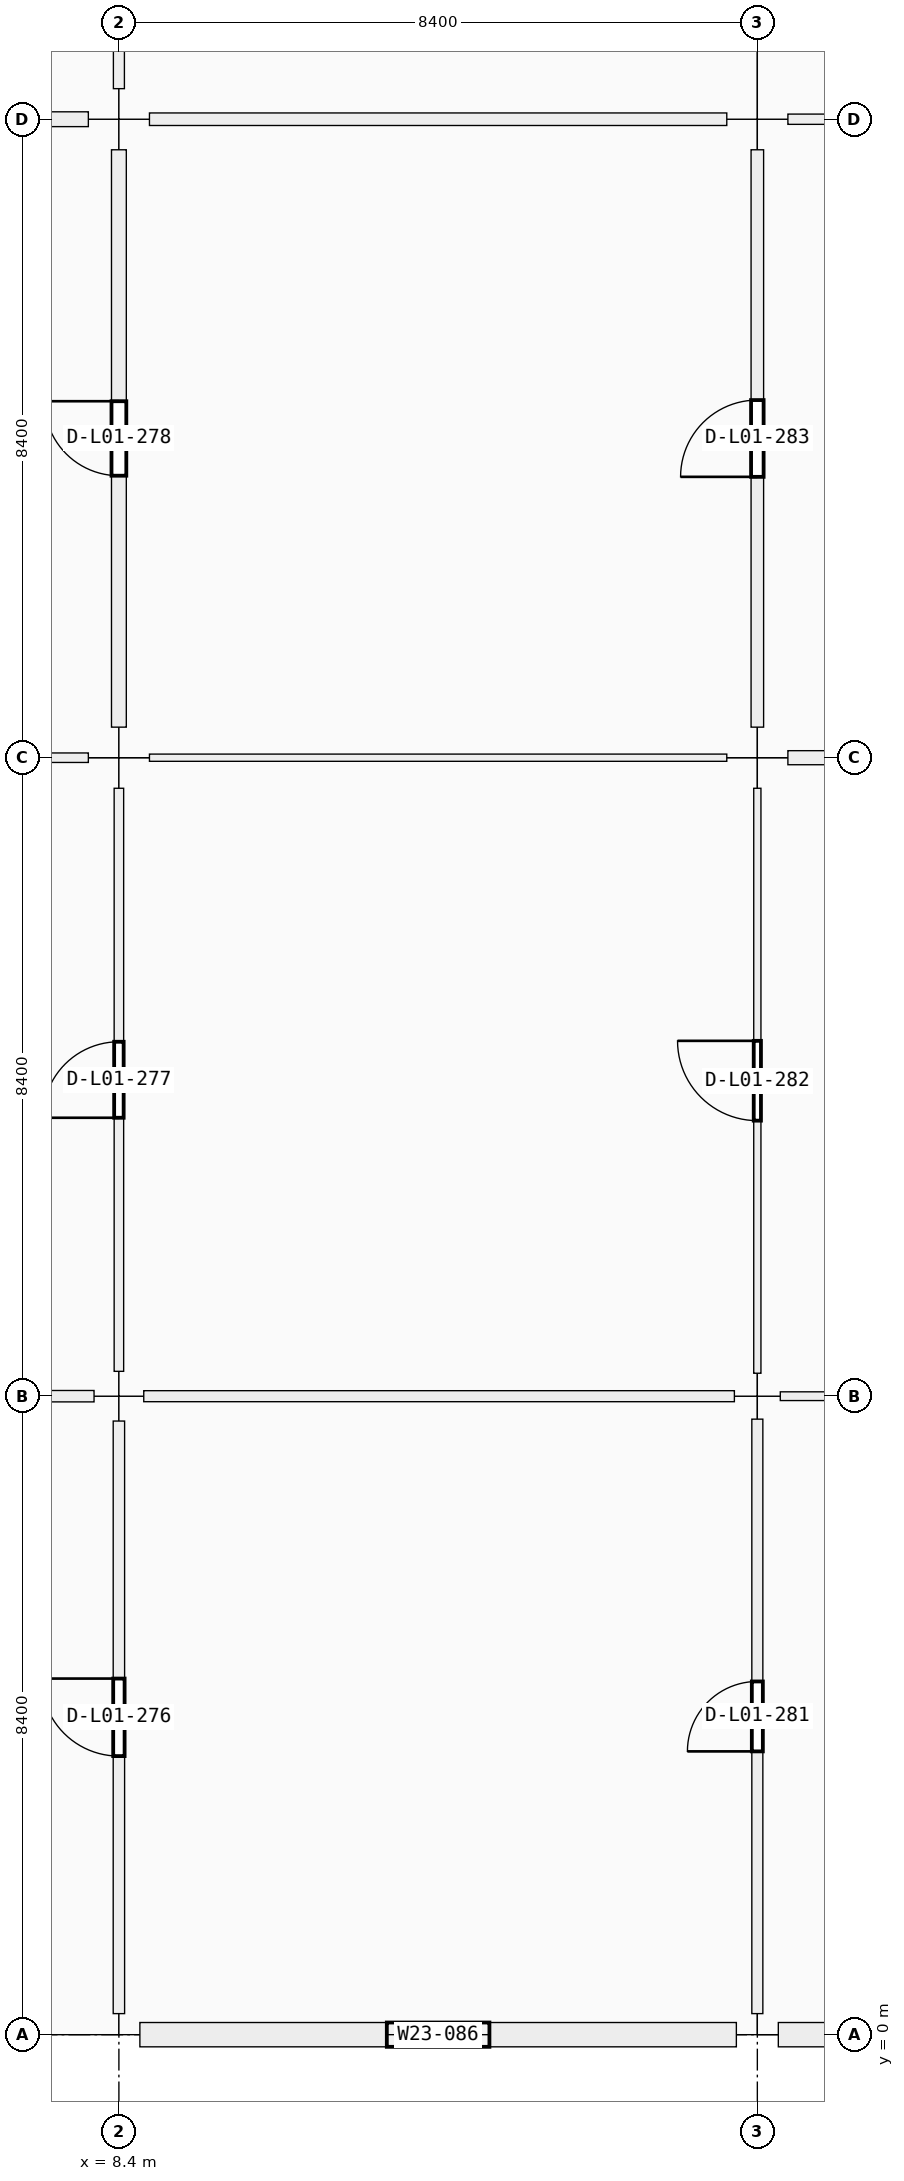
"""IFC4 building model, lengths in metres.
Left out: names, types, materials, properties, quantities, classifications, styles, units other than length and angle.
Written with IfcOpenShell. Run it as: python <this file> out.ifc"""

import sys

from ifc_helpers import new_model, si_unit, direction, frame, frame_2d, origin, origin_2d, place, context, subcontext, project, spatial, rectangle, extrude, element, fill, save


model = new_model("IFC4")
c1 = context("Model", 3, precision=1e-05, world=origin(), true_north=direction((0.0, 1.0)))
c2 = subcontext(c1, "Body", "Model", "MODEL_VIEW")
j1 = project(units=[si_unit("LENGTHUNIT", "METRE"), si_unit("PLANEANGLEUNIT", "RADIAN")], contexts=[c1])
p1 = place(None, origin())
s1 = spatial("IfcSite", under=j1, at=p1, CompositionType="ELEMENT")
p2 = place(p1, origin())
s2 = spatial("IfcBuilding", under=s1, at=p2, CompositionType="ELEMENT")
p3 = place(p2, frame((0.0, 0.0, 5.76)))
s3 = spatial("IfcBuildingStorey", under=s2, at=p3, CompositionType="ELEMENT", Elevation=5.76)
p4 = place(p3, frame((8.4, 0.0, 0.0), z_axis=(0.0, 0.0, 1.0), x_axis=(1.0, 0.0, 0.0)))
e1 = element("IfcColumn", 1, at=p4, inside=s3, PredefinedType="COLUMN", context=c2, shape_type="SweptSolid", body=[
    extrude(rectangle(XDim=0.55, YDim=0.55, at=origin_2d()), origin(), (0.0, 0.0, 1.0), 4.2),
])
p5 = place(p3, frame((8.4, 8.4, 0.0), z_axis=(0.0, 0.0, 1.0), x_axis=(1.0, 0.0, 0.0)))
e2 = element("IfcColumn", 2, at=p5, inside=s3, PredefinedType="COLUMN", context=c2, shape_type="SweptSolid", body=[
    extrude(rectangle(XDim=0.65, YDim=0.65, at=origin_2d()), origin(), (0.0, 0.0, 1.0), 4.5),
])
for number, where, z_axis, x_axis in (
    (3, (8.4, 16.8, 0.0), (0.0, 0.0, 1.0), (1.0, 0.0, 0.0)),
    (4, (8.4, 25.2, 0.0), (0.0, 0.0, 1.0), (1.0, 0.0, 0.0)),
):
    element("IfcColumn", number, at=place(p3, frame(where, z_axis=z_axis, x_axis=x_axis)), inside=s3, PredefinedType="COLUMN", context=c2, shape_type="SweptSolid", body=[
        extrude(rectangle(XDim=0.8, YDim=0.8, at=origin_2d()), origin(), (0.0, 0.0, 1.0), 4.5),
    ])
p6 = place(p3, frame((16.8, 0.0, 0.0), z_axis=(0.0, 0.0, 1.0), x_axis=(1.0, 0.0, 0.0)))
e5 = element("IfcColumn", 5, at=p6, inside=s3, PredefinedType="COLUMN", context=c2, shape_type="SweptSolid", body=[
    extrude(rectangle(XDim=0.55, YDim=0.55, at=origin_2d()), origin(), (0.0, 0.0, 1.0), 4.2),
])
p7 = place(p3, frame((16.8, 8.4, 0.0), z_axis=(0.0, 0.0, 1.0), x_axis=(1.0, 0.0, 0.0)))
e6 = element("IfcColumn", 6, at=p7, inside=s3, PredefinedType="COLUMN", context=c2, shape_type="SweptSolid", body=[
    extrude(rectangle(XDim=0.6, YDim=0.6, at=origin_2d()), origin(), (0.0, 0.0, 1.0), 4.5),
])
for number, where, z_axis, x_axis in (
    (7, (16.8, 16.8, 0.0), (0.0, 0.0, 1.0), (1.0, 0.0, 0.0)),
    (8, (16.8, 25.2, 0.0), (0.0, 0.0, 1.0), (1.0, 0.0, 0.0)),
):
    element("IfcColumn", number, at=place(p3, frame(where, z_axis=z_axis, x_axis=x_axis)), inside=s3, PredefinedType="COLUMN", context=c2, shape_type="SweptSolid", body=[
        extrude(rectangle(XDim=0.8, YDim=0.8, at=origin_2d()), origin(), (0.0, 0.0, 1.0), 4.5),
    ])
p8 = place(p3, frame((16.524, 0.0, 0.0), z_axis=(0.0, 0.0, 1.0), x_axis=(-1.0, 0.0, 0.0)))
e9 = element("IfcWall", 9, at=p8, inside=s3, PredefinedType="SOLIDWALL", context=c2, shape_type="SweptSolid", body=[
    extrude(rectangle(XDim=7.848, YDim=0.32, at=frame_2d((3.924, 0.0))), origin(), (0.0, 0.0, 1.0), 3.4),
])
p9 = place(p8, frame((3.249, 0.0, 0.9)))
e10 = element("IfcOpeningElement", 10, at=p9, cuts=e9, PredefinedType="OPENING", context=c2, shape_type="SweptSolid", body=[
    extrude(rectangle(XDim=1.35, YDim=1.5, at=frame_2d((0.675, 0.75))), frame((0.0, 0.16, 0.0), z_axis=(0.0, -1.0, 0.0), x_axis=(1.0, 0.0, 0.0)), (0.0, 0.0, 1.0), 0.32),
])
p10 = place(p3, frame((24.924, 0.0, 0.0), z_axis=(0.0, 0.0, 1.0), x_axis=(-1.0, 0.0, 0.0)))
e11 = element("IfcWall", 11, at=p10, inside=s3, PredefinedType="SOLIDWALL", context=c2, shape_type="SweptSolid", body=[
    extrude(rectangle(XDim=7.848, YDim=0.32, at=frame_2d((3.924, 0.0))), origin(), (0.0, 0.0, 1.0), 3.4),
])
p11 = place(p10, frame((3.374, 0.0, 0.9)))
e12 = element("IfcOpeningElement", 12, at=p11, cuts=e11, PredefinedType="OPENING", context=c2, shape_type="SweptSolid", body=[
    extrude(rectangle(XDim=1.1, YDim=1.5, at=frame_2d((0.55, 0.75))), frame((0.0, 0.16, 0.0), z_axis=(0.0, -1.0, 0.0), x_axis=(1.0, 0.0, 0.0)), (0.0, 0.0, 1.0), 0.32),
])
p12 = place(p3, frame((0.277, 8.4, 0.0), z_axis=(0.0, 0.0, 1.0), x_axis=(1.0, 0.0, 0.0)))
e13 = element("IfcWall", 13, at=p12, inside=s3, PredefinedType="MOVABLE", context=c2, shape_type="SweptSolid", body=[
    extrude(rectangle(XDim=7.796, YDim=0.15, at=frame_2d((3.898, 0.0))), origin(), (0.0, 0.0, 1.0), 2.4),
])
p13 = place(p12, frame((3.358, 0.0, 0.0)))
e14 = element("IfcOpeningElement", 14, at=p13, cuts=e13, PredefinedType="OPENING", context=c2, shape_type="SweptSolid", body=[
    extrude(rectangle(XDim=1.08, YDim=2.22, at=frame_2d((0.54, 1.11))), frame((0.0, 0.075, 0.0), z_axis=(0.0, -1.0, 0.0), x_axis=(1.0, 0.0, 0.0)), (0.0, 0.0, 1.0), 0.15),
])
p14 = place(p3, frame((0.277, 16.8, 0.0), z_axis=(0.0, 0.0, 1.0), x_axis=(1.0, 0.0, 0.0)))
e15 = element("IfcWall", 15, at=p14, inside=s3, PredefinedType="PARTITIONING", context=c2, shape_type="SweptSolid", body=[
    extrude(rectangle(XDim=7.721, YDim=0.125, at=frame_2d((3.86, 0.0))), origin(), (0.0, 0.0, 1.0), 2.4),
])
p15 = place(p14, frame((3.33, 0.0, 0.0)))
e16 = element("IfcOpeningElement", 16, at=p15, cuts=e15, PredefinedType="OPENING", context=c2, shape_type="SweptSolid", body=[
    extrude(rectangle(XDim=1.06, YDim=2.22, at=frame_2d((0.53, 1.11))), frame((0.0, 0.062, 0.0), z_axis=(0.0, -1.0, 0.0), x_axis=(1.0, 0.0, 0.0)), (0.0, 0.0, 1.0), 0.125),
])
p16 = place(p3, frame((0.277, 25.2, 0.0), z_axis=(0.0, 0.0, 1.0), x_axis=(1.0, 0.0, 0.0)))
e17 = element("IfcWall", 17, at=p16, inside=s3, PredefinedType="PARTITIONING", context=c2, shape_type="SweptSolid", body=[
    extrude(rectangle(XDim=7.721, YDim=0.195, at=frame_2d((3.86, 0.0))), origin(), (0.0, 0.0, 1.0), 2.4),
])
p17 = place(p16, frame((3.396, 0.0, 0.0)))
e18 = element("IfcOpeningElement", 18, at=p17, cuts=e17, PredefinedType="OPENING", context=c2, shape_type="SweptSolid", body=[
    extrude(rectangle(XDim=0.93, YDim=2.12, at=frame_2d((0.465, 1.06))), frame((0.0, 0.098, 0.0), z_axis=(0.0, -1.0, 0.0), x_axis=(1.0, 0.0, 0.0)), (0.0, 0.0, 1.0), 0.195),
])
p18 = place(p3, frame((8.727, 8.4, 0.0), z_axis=(0.0, 0.0, 1.0), x_axis=(1.0, 0.0, 0.0)))
e19 = element("IfcWall", 19, at=p18, inside=s3, PredefinedType="PARTITIONING", context=c2, shape_type="SweptSolid", body=[
    extrude(rectangle(XDim=7.771, YDim=0.145, at=frame_2d((3.885, 0.0))), origin(), (0.0, 0.0, 1.0), 2.4),
])
p19 = place(p18, frame((3.415, 0.0, 0.0)))
e20 = element("IfcOpeningElement", 20, at=p19, cuts=e19, PredefinedType="OPENING", context=c2, shape_type="SweptSolid", body=[
    extrude(rectangle(XDim=0.94, YDim=2.15, at=frame_2d((0.47, 1.075))), frame((0.0, 0.073, 0.0), z_axis=(0.0, -1.0, 0.0), x_axis=(1.0, 0.0, 0.0)), (0.0, 0.0, 1.0), 0.145),
])
p20 = place(p3, frame((8.802, 16.8, 0.0), z_axis=(0.0, 0.0, 1.0), x_axis=(1.0, 0.0, 0.0)))
e21 = element("IfcWall", 21, at=p20, inside=s3, PredefinedType="PARTITIONING", context=c2, shape_type="SweptSolid", body=[
    extrude(rectangle(XDim=7.596, YDim=0.095, at=frame_2d((3.798, 0.0))), origin(), (0.0, 0.0, 1.0), 2.4),
])
p21 = place(p20, frame((3.258, 0.0, 0.0)))
e22 = element("IfcOpeningElement", 22, at=p21, cuts=e21, PredefinedType="OPENING", context=c2, shape_type="SweptSolid", body=[
    extrude(rectangle(XDim=1.08, YDim=2.22, at=frame_2d((0.54, 1.11))), frame((0.0, 0.047, 0.0), z_axis=(0.0, -1.0, 0.0), x_axis=(1.0, 0.0, 0.0)), (0.0, 0.0, 1.0), 0.095),
])
p22 = place(p3, frame((8.802, 25.2, 0.0), z_axis=(0.0, 0.0, 1.0), x_axis=(1.0, 0.0, 0.0)))
e23 = element("IfcWall", 23, at=p22, inside=s3, PredefinedType="PARTITIONING", context=c2, shape_type="SweptSolid", body=[
    extrude(rectangle(XDim=7.596, YDim=0.165, at=frame_2d((3.798, 0.0))), origin(), (0.0, 0.0, 1.0), 2.4),
])
p23 = place(p22, frame((3.318, 0.0, 0.0)))
e24 = element("IfcOpeningElement", 24, at=p23, cuts=e23, PredefinedType="OPENING", context=c2, shape_type="SweptSolid", body=[
    extrude(rectangle(XDim=0.96, YDim=2.18, at=frame_2d((0.48, 1.09))), frame((0.0, 0.083, 0.0), z_axis=(0.0, -1.0, 0.0), x_axis=(1.0, 0.0, 0.0)), (0.0, 0.0, 1.0), 0.165),
])
p24 = place(p3, frame((17.102, 8.4, 0.0), z_axis=(0.0, 0.0, 1.0), x_axis=(1.0, 0.0, 0.0)))
e25 = element("IfcWall", 25, at=p24, inside=s3, PredefinedType="PARTITIONING", context=c2, shape_type="SweptSolid", body=[
    extrude(rectangle(XDim=7.771, YDim=0.115, at=frame_2d((3.885, 0.0))), origin(), (0.0, 0.0, 1.0), 2.4),
])
p25 = place(p24, frame((3.361, 0.0, 0.0)))
e26 = element("IfcOpeningElement", 26, at=p25, cuts=e25, PredefinedType="OPENING", context=c2, shape_type="SweptSolid", body=[
    extrude(rectangle(XDim=1.05, YDim=2.12, at=frame_2d((0.525, 1.06))), frame((0.0, 0.058, 0.0), z_axis=(0.0, -1.0, 0.0), x_axis=(1.0, 0.0, 0.0)), (0.0, 0.0, 1.0), 0.115),
])
p26 = place(p3, frame((17.202, 16.8, 0.0), z_axis=(0.0, 0.0, 1.0), x_axis=(1.0, 0.0, 0.0)))
e27 = element("IfcWall", 27, at=p26, inside=s3, PredefinedType="PARTITIONING", context=c2, shape_type="SweptSolid", body=[
    extrude(rectangle(XDim=7.596, YDim=0.185, at=frame_2d((3.798, 0.0))), origin(), (0.0, 0.0, 1.0), 2.4),
])
p27 = place(p26, frame((3.268, 0.0, 0.0)))
e28 = element("IfcOpeningElement", 28, at=p27, cuts=e27, PredefinedType="OPENING", context=c2, shape_type="SweptSolid", body=[
    extrude(rectangle(XDim=1.06, YDim=2.22, at=frame_2d((0.53, 1.11))), frame((0.0, 0.093, 0.0), z_axis=(0.0, -1.0, 0.0), x_axis=(1.0, 0.0, 0.0)), (0.0, 0.0, 1.0), 0.185),
])
p28 = place(p3, frame((17.202, 25.2, 0.0), z_axis=(0.0, 0.0, 1.0), x_axis=(1.0, 0.0, 0.0)))
e29 = element("IfcWall", 29, at=p28, inside=s3, PredefinedType="PARTITIONING", context=c2, shape_type="SweptSolid", body=[
    extrude(rectangle(XDim=7.596, YDim=0.135, at=frame_2d((3.798, 0.0))), origin(), (0.0, 0.0, 1.0), 2.4),
])
p29 = place(p28, frame((3.338, 0.0, 0.0)))
e30 = element("IfcOpeningElement", 30, at=p29, cuts=e29, PredefinedType="OPENING", context=c2, shape_type="SweptSolid", body=[
    extrude(rectangle(XDim=0.92, YDim=2.15, at=frame_2d((0.46, 1.075))), frame((0.0, 0.067, 0.0), z_axis=(0.0, -1.0, 0.0), x_axis=(1.0, 0.0, 0.0)), (0.0, 0.0, 1.0), 0.135),
])
p30 = place(p3, frame((8.4, 0.277, 0.0), z_axis=(0.0, 0.0, 1.0), x_axis=(0.0, 1.0, 0.0)))
e31 = element("IfcWall", 31, at=p30, inside=s3, PredefinedType="MOVABLE", context=c2, shape_type="SweptSolid", body=[
    extrude(rectangle(XDim=7.796, YDim=0.15, at=frame_2d((3.898, 0.0))), origin(), (0.0, 0.0, 1.0), 2.4),
])
p31 = place(p30, frame((3.388, 0.0, 0.0)))
e32 = element("IfcOpeningElement", 32, at=p31, cuts=e31, PredefinedType="OPENING", context=c2, shape_type="SweptSolid", body=[
    extrude(rectangle(XDim=1.02, YDim=2.2, at=frame_2d((0.51, 1.1))), frame((0.0, 0.075, 0.0), z_axis=(0.0, -1.0, 0.0), x_axis=(1.0, 0.0, 0.0)), (0.0, 0.0, 1.0), 0.15),
])
p32 = place(p3, frame((8.4, 8.727, 0.0), z_axis=(0.0, 0.0, 1.0), x_axis=(0.0, 1.0, 0.0)))
e33 = element("IfcWall", 33, at=p32, inside=s3, PredefinedType="PARTITIONING", context=c2, shape_type="SweptSolid", body=[
    extrude(rectangle(XDim=7.671, YDim=0.125, at=frame_2d((3.835, 0.0))), origin(), (0.0, 0.0, 1.0), 2.4),
])
p33 = place(p32, frame((3.336, 0.0, 0.0)))
e34 = element("IfcOpeningElement", 34, at=p33, cuts=e33, PredefinedType="OPENING", context=c2, shape_type="SweptSolid", body=[
    extrude(rectangle(XDim=1.0, YDim=2.2, at=frame_2d((0.5, 1.1))), frame((0.0, 0.062, 0.0), z_axis=(0.0, -1.0, 0.0), x_axis=(1.0, 0.0, 0.0)), (0.0, 0.0, 1.0), 0.125),
])
p34 = place(p3, frame((8.4, 17.202, 0.0), z_axis=(0.0, 0.0, 1.0), x_axis=(0.0, 1.0, 0.0)))
e35 = element("IfcWall", 35, at=p34, inside=s3, PredefinedType="PARTITIONING", context=c2, shape_type="SweptSolid", body=[
    extrude(rectangle(XDim=7.596, YDim=0.195, at=frame_2d((3.798, 0.0))), origin(), (0.0, 0.0, 1.0), 2.4),
])
p35 = place(p34, frame((3.308, 0.0, 0.0)))
e36 = element("IfcOpeningElement", 36, at=p35, cuts=e35, PredefinedType="OPENING", context=c2, shape_type="SweptSolid", body=[
    extrude(rectangle(XDim=0.98, YDim=2.18, at=frame_2d((0.49, 1.09))), frame((0.0, 0.098, 0.0), z_axis=(0.0, -1.0, 0.0), x_axis=(1.0, 0.0, 0.0)), (0.0, 0.0, 1.0), 0.195),
])
p36 = place(p3, frame((8.4, 25.602, 0.0), z_axis=(0.0, 0.0, 1.0), x_axis=(0.0, 1.0, 0.0)))
e37 = element("IfcWall", 37, at=p36, inside=s3, PredefinedType="PARTITIONING", context=c2, shape_type="SweptSolid", body=[
    extrude(rectangle(XDim=7.596, YDim=0.145, at=frame_2d((3.798, 0.0))), origin(), (0.0, 0.0, 1.0), 2.4),
])
p37 = place(p36, frame((3.313, 0.0, 0.0)))
e38 = element("IfcOpeningElement", 38, at=p37, cuts=e37, PredefinedType="OPENING", context=c2, shape_type="SweptSolid", body=[
    extrude(rectangle(XDim=0.97, YDim=2.12, at=frame_2d((0.485, 1.06))), frame((0.0, 0.073, 0.0), z_axis=(0.0, -1.0, 0.0), x_axis=(1.0, 0.0, 0.0)), (0.0, 0.0, 1.0), 0.145),
])
p38 = place(p3, frame((16.8, 0.277, 0.0), z_axis=(0.0, 0.0, 1.0), x_axis=(0.0, 1.0, 0.0)))
e39 = element("IfcWall", 39, at=p38, inside=s3, PredefinedType="PARTITIONING", context=c2, shape_type="SweptSolid", body=[
    extrude(rectangle(XDim=7.821, YDim=0.145, at=frame_2d((3.91, 0.0))), origin(), (0.0, 0.0, 1.0), 2.4),
])
p39 = place(p38, frame((3.45, 0.0, 0.0)))
e40 = element("IfcOpeningElement", 40, at=p39, cuts=e39, PredefinedType="OPENING", context=c2, shape_type="SweptSolid", body=[
    extrude(rectangle(XDim=0.92, YDim=2.15, at=frame_2d((0.46, 1.075))), frame((0.0, 0.073, 0.0), z_axis=(0.0, -1.0, 0.0), x_axis=(1.0, 0.0, 0.0)), (0.0, 0.0, 1.0), 0.145),
])
p40 = place(p3, frame((16.8, 8.702, 0.0), z_axis=(0.0, 0.0, 1.0), x_axis=(0.0, 1.0, 0.0)))
e41 = element("IfcWall", 41, at=p40, inside=s3, PredefinedType="PARTITIONING", context=c2, shape_type="SweptSolid", body=[
    extrude(rectangle(XDim=7.696, YDim=0.095, at=frame_2d((3.848, 0.0))), origin(), (0.0, 0.0, 1.0), 2.4),
])
p41 = place(p40, frame((3.323, 0.0, 0.0)))
e42 = element("IfcOpeningElement", 42, at=p41, cuts=e41, PredefinedType="OPENING", context=c2, shape_type="SweptSolid", body=[
    extrude(rectangle(XDim=1.05, YDim=2.12, at=frame_2d((0.525, 1.06))), frame((0.0, 0.047, 0.0), z_axis=(0.0, -1.0, 0.0), x_axis=(1.0, 0.0, 0.0)), (0.0, 0.0, 1.0), 0.095),
])
p42 = place(p3, frame((16.8, 17.202, 0.0), z_axis=(0.0, 0.0, 1.0), x_axis=(0.0, 1.0, 0.0)))
e43 = element("IfcWall", 43, at=p42, inside=s3, PredefinedType="PARTITIONING", context=c2, shape_type="SweptSolid", body=[
    extrude(rectangle(XDim=7.596, YDim=0.165, at=frame_2d((3.798, 0.0))), origin(), (0.0, 0.0, 1.0), 2.4),
])
p43 = place(p42, frame((3.293, 0.0, 0.0)))
e44 = element("IfcOpeningElement", 44, at=p43, cuts=e43, PredefinedType="OPENING", context=c2, shape_type="SweptSolid", body=[
    extrude(rectangle(XDim=1.01, YDim=2.12, at=frame_2d((0.505, 1.06))), frame((0.0, 0.083, 0.0), z_axis=(0.0, -1.0, 0.0), x_axis=(1.0, 0.0, 0.0)), (0.0, 0.0, 1.0), 0.165),
])
p44 = place(p9, origin())
e45 = element("IfcWindow", 45, at=p44, inside=s3, PartitioningType="SINGLE_PANEL", PredefinedType="WINDOW", context=c2, shape_type="SweptSolid", body=[
    extrude(rectangle(XDim=1.35, YDim=1.5, at=frame_2d((0.675, 0.75))), frame((0.0, 0.03, 0.0), z_axis=(0.0, -1.0, 0.0), x_axis=(1.0, 0.0, 0.0)), (0.0, 0.0, 1.0), 0.06),
])
fill(e10, e45)
p45 = place(p23, origin())
e46 = element("IfcDoor", 46, at=p45, inside=s3, OperationType="SINGLE_SWING_RIGHT", PredefinedType="DOOR", context=c2, shape_type="SweptSolid", body=[
    extrude(rectangle(XDim=0.96, YDim=2.18, at=frame_2d((0.48, 1.09))), frame((0.0, 0.025, 0.0), z_axis=(0.0, -1.0, 0.0), x_axis=(1.0, 0.0, 0.0)), (0.0, 0.0, 1.0), 0.05),
])
fill(e24, e46)
p46 = place(p19, origin())
e47 = element("IfcDoor", 47, at=p46, inside=s3, OperationType="SINGLE_SWING_RIGHT", PredefinedType="DOOR", context=c2, shape_type="SweptSolid", body=[
    extrude(rectangle(XDim=0.94, YDim=2.15, at=frame_2d((0.47, 1.075))), frame((0.0, 0.025, 0.0), z_axis=(0.0, -1.0, 0.0), x_axis=(1.0, 0.0, 0.0)), (0.0, 0.0, 1.0), 0.05),
])
fill(e20, e47)
p47 = place(p21, origin())
e48 = element("IfcDoor", 48, at=p47, inside=s3, OperationType="SINGLE_SWING_RIGHT", PredefinedType="DOOR", context=c2, shape_type="SweptSolid", body=[
    extrude(rectangle(XDim=1.08, YDim=2.22, at=frame_2d((0.54, 1.11))), frame((0.0, 0.025, 0.0), z_axis=(0.0, -1.0, 0.0), x_axis=(1.0, 0.0, 0.0)), (0.0, 0.0, 1.0), 0.05),
])
fill(e22, e48)
p48 = place(p31, origin())
e49 = element("IfcDoor", 49, at=p48, inside=s3, OperationType="SINGLE_SWING_RIGHT", PredefinedType="DOOR", context=c2, shape_type="SweptSolid", body=[
    extrude(rectangle(XDim=1.02, YDim=2.2, at=frame_2d((0.51, 1.1))), frame((0.0, 0.025, 0.0), z_axis=(0.0, -1.0, 0.0), x_axis=(1.0, 0.0, 0.0)), (0.0, 0.0, 1.0), 0.05),
])
fill(e32, e49)
p49 = place(p33, origin())
e50 = element("IfcDoor", 50, at=p49, inside=s3, OperationType="SINGLE_SWING_LEFT", PredefinedType="DOOR", context=c2, shape_type="SweptSolid", body=[
    extrude(rectangle(XDim=1.0, YDim=2.2, at=frame_2d((0.5, 1.1))), frame((0.0, 0.025, 0.0), z_axis=(0.0, -1.0, 0.0), x_axis=(1.0, 0.0, 0.0)), (0.0, 0.0, 1.0), 0.05),
])
fill(e34, e50)
p50 = place(p35, origin())
e51 = element("IfcDoor", 51, at=p50, inside=s3, OperationType="SINGLE_SWING_RIGHT", PredefinedType="DOOR", context=c2, shape_type="SweptSolid", body=[
    extrude(rectangle(XDim=0.98, YDim=2.18, at=frame_2d((0.49, 1.09))), frame((0.0, 0.025, 0.0), z_axis=(0.0, -1.0, 0.0), x_axis=(1.0, 0.0, 0.0)), (0.0, 0.0, 1.0), 0.05),
])
fill(e36, e51)
p51 = place(p39, origin())
e52 = element("IfcDoor", 52, at=p51, inside=s3, OperationType="SINGLE_SWING_LEFT", PredefinedType="DOOR", context=c2, shape_type="SweptSolid", body=[
    extrude(rectangle(XDim=0.92, YDim=2.15, at=frame_2d((0.46, 1.075))), frame((0.0, 0.025, 0.0), z_axis=(0.0, -1.0, 0.0), x_axis=(1.0, 0.0, 0.0)), (0.0, 0.0, 1.0), 0.05),
])
fill(e40, e52)
p52 = place(p41, origin())
e53 = element("IfcDoor", 53, at=p52, inside=s3, OperationType="SINGLE_SWING_RIGHT", PredefinedType="DOOR", context=c2, shape_type="SweptSolid", body=[
    extrude(rectangle(XDim=1.05, YDim=2.12, at=frame_2d((0.525, 1.06))), frame((0.0, 0.025, 0.0), z_axis=(0.0, -1.0, 0.0), x_axis=(1.0, 0.0, 0.0)), (0.0, 0.0, 1.0), 0.05),
])
fill(e42, e53)
p53 = place(p43, origin())
e54 = element("IfcDoor", 54, at=p53, inside=s3, OperationType="SINGLE_SWING_LEFT", PredefinedType="DOOR", context=c2, shape_type="SweptSolid", body=[
    extrude(rectangle(XDim=1.01, YDim=2.12, at=frame_2d((0.505, 1.06))), frame((0.0, 0.025, 0.0), z_axis=(0.0, -1.0, 0.0), x_axis=(1.0, 0.0, 0.0)), (0.0, 0.0, 1.0), 0.05),
])
fill(e44, e54)
save(model, sys.argv[1])
